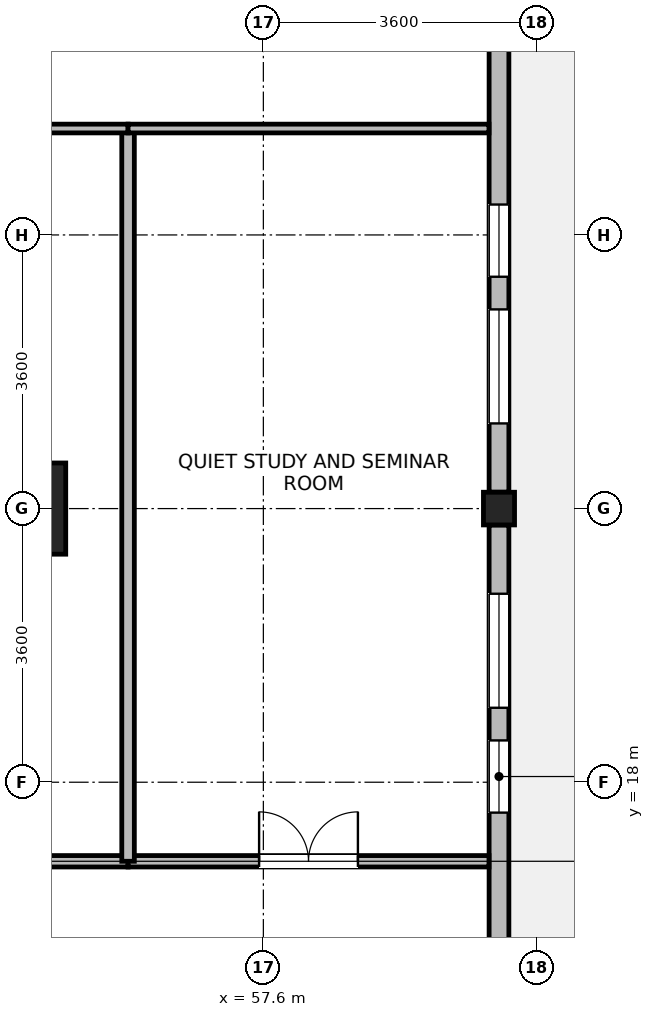
"""IFC4 building model, lengths in metres.
Left out: names, types, materials, properties, quantities, classifications, styles, units other than length and angle.
Written with IfcOpenShell. Run it as: python <this file> out.ifc"""

import sys

from ifc_helpers import new_model, si_unit, direction, frame, frame_2d, origin, origin_2d, place, context, subcontext, project, spatial, rectangle, i_section, extrude, source, transform, mapped, element, fill, save


model = new_model("IFC4")
c1 = context("Model", 3, precision=1e-05, world=origin(), true_north=direction((0.0, 1.0)))
c2 = subcontext(c1, "Body", "Model", "MODEL_VIEW")
j1 = project(units=[si_unit("LENGTHUNIT", "METRE"), si_unit("PLANEANGLEUNIT", "RADIAN")], contexts=[c1])
p1 = place(None, origin())
s1 = spatial("IfcSite", under=j1, at=p1, CompositionType="ELEMENT")
p2 = place(p1, origin())
s2 = spatial("IfcBuilding", under=s1, at=p2, CompositionType="ELEMENT")
p3 = place(p2, frame((0.0, 0.0, 123.0)))
s3 = spatial("IfcBuildingStorey", under=s2, at=p3, CompositionType="ELEMENT", Elevation=123.0)
m1 = source(origin(), c2, "Body", "SweptSolid", [
    extrude(rectangle(XDim=1.2, YDim=1.2, at=origin_2d()), origin(), (0.0, 0.0, 1.0), 3.7),
])
p4 = place(p3, frame((54.4, 21.6, 0.0), z_axis=(0.0, 0.0, 1.0), x_axis=(1.0, 0.0, 0.0)))
e1 = element("IfcColumn", 1, at=p4, inside=s3, PredefinedType="COLUMN", context=c2, shape_type="MappedRepresentation", body=[
    mapped(m1, transform((0.0, 0.0, 0.0), x_axis=(1.0, 0.0, 0.0), y_axis=(0.0, 1.0, 0.0), z_axis=(0.0, 0.0, 1.0), scale=1.0)),
])
m2 = source(origin(), c2, "Body", "SweptSolid", [
    extrude(i_section(OverallWidth=0.409, OverallDepth=0.43, WebThickness=0.024, FlangeThickness=0.033, FilletRadius=0.015, at=origin_2d()), origin(), (0.0, 0.0, 1.0), 3.7),
])
p5 = place(p3, frame((60.7, 21.6, 0.0), z_axis=(0.0, 0.0, 1.0), x_axis=(1.0, 0.0, 0.0)))
e2 = element("IfcColumn", 2, at=p5, inside=s3, PredefinedType="COLUMN", context=c2, shape_type="MappedRepresentation", body=[
    mapped(m2, transform((0.0, 0.0, 0.0), x_axis=(1.0, 0.0, 0.0), y_axis=(0.0, 1.0, 0.0), z_axis=(0.0, 0.0, 1.0), scale=1.0)),
])
p6 = place(p3, frame((60.7, 21.384, 0.0), z_axis=(0.0, 0.0, 1.0), x_axis=(0.0, -1.0, 0.0)))
e3 = element("IfcWall", 3, at=p6, inside=s3, PredefinedType="STANDARD", context=c2, shape_type="SweptSolid", body=[
    extrude(rectangle(XDim=6.618, YDim=0.26, at=frame_2d((3.309, 0.0))), origin(), (0.0, 0.0, 1.0), 2.98),
])
p7 = place(p6, frame((0.905, 0.0, 0.85)))
e4 = element("IfcOpeningElement", 4, at=p7, cuts=e3, PredefinedType="OPENING", context=c2, shape_type="SweptSolid", body=[
    extrude(rectangle(XDim=1.5, YDim=1.85, at=frame_2d((0.75, 0.925))), frame((0.0, 0.14, 0.0), z_axis=(0.0, -1.0, 0.0), x_axis=(1.0, 0.0, 0.0)), (0.0, 0.0, 1.0), 0.28),
])
p8 = place(p6, frame((2.834, 0.0, 0.85)))
e5 = element("IfcOpeningElement", 5, at=p8, cuts=e3, PredefinedType="OPENING", context=c2, shape_type="SweptSolid", body=[
    extrude(rectangle(XDim=0.95, YDim=1.75, at=frame_2d((0.475, 0.875))), frame((0.0, 0.14, 0.0), z_axis=(0.0, -1.0, 0.0), x_axis=(1.0, 0.0, 0.0)), (0.0, 0.0, 1.0), 0.28),
])
p9 = place(p3, frame((60.7, 28.434, 0.0), z_axis=(0.0, 0.0, 1.0), x_axis=(0.0, -1.0, 0.0)))
e6 = element("IfcWall", 6, at=p9, inside=s3, PredefinedType="STANDARD", context=c2, shape_type="SweptSolid", body=[
    extrude(rectangle(XDim=6.618, YDim=0.26, at=frame_2d((3.309, 0.0))), origin(), (0.0, 0.0, 1.0), 2.98),
])
p10 = place(p9, frame((4.213, 0.0, 0.85)))
e7 = element("IfcOpeningElement", 7, at=p10, cuts=e6, PredefinedType="OPENING", context=c2, shape_type="SweptSolid", body=[
    extrude(rectangle(XDim=1.5, YDim=1.85, at=frame_2d((0.75, 0.925))), frame((0.0, 0.14, 0.0), z_axis=(0.0, -1.0, 0.0), x_axis=(1.0, 0.0, 0.0)), (0.0, 0.0, 1.0), 0.28),
])
p11 = place(p9, frame((2.834, 0.0, 0.85)))
e8 = element("IfcOpeningElement", 8, at=p11, cuts=e6, PredefinedType="OPENING", context=c2, shape_type="SweptSolid", body=[
    extrude(rectangle(XDim=0.95, YDim=1.75, at=frame_2d((0.475, 0.875))), frame((0.0, 0.14, 0.0), z_axis=(0.0, -1.0, 0.0), x_axis=(1.0, 0.0, 0.0)), (0.0, 0.0, 1.0), 0.28),
])
p12 = place(p3, frame((48.44, 16.96, 0.0), z_axis=(0.0, 0.0, 1.0), x_axis=(1.0, 0.0, 0.0)))
e9 = element("IfcWall", 9, at=p12, inside=s3, PredefinedType="PARTITIONING", context=c2, shape_type="SweptSolid", body=[
    extrude(rectangle(XDim=7.38, YDim=0.15, at=frame_2d((3.69, 0.0))), origin(), (0.0, 0.0, 1.0), 3.43),
])
p13 = place(p12, frame((3.24, 0.0, 0.0)))
e10 = element("IfcOpeningElement", 10, at=p13, cuts=e9, PredefinedType="OPENING", context=c2, shape_type="SweptSolid", body=[
    extrude(rectangle(XDim=0.9, YDim=2.08, at=frame_2d((0.45, 1.04))), frame((0.0, 0.085, 0.0), z_axis=(0.0, -1.0, 0.0), x_axis=(1.0, 0.0, 0.0)), (0.0, 0.0, 1.0), 0.17),
])
p14 = place(p3, frame((55.82, 16.96, 0.0), z_axis=(0.0, 0.0, 1.0), x_axis=(1.0, 0.0, 0.0)))
e11 = element("IfcWall", 11, at=p14, inside=s3, PredefinedType="PARTITIONING", context=c2, shape_type="SweptSolid", body=[
    extrude(rectangle(XDim=4.748, YDim=0.15, at=frame_2d((2.374, 0.0))), origin(), (0.0, 0.0, 1.0), 3.43),
])
p15 = place(p14, frame((1.724, 0.0, 0.0)))
e12 = element("IfcOpeningElement", 12, at=p15, cuts=e11, PredefinedType="OPENING", context=c2, shape_type="SweptSolid", body=[
    extrude(rectangle(XDim=1.3, YDim=2.12, at=frame_2d((0.65, 1.06))), frame((0.0, 0.085, 0.0), z_axis=(0.0, -1.0, 0.0), x_axis=(1.0, 0.0, 0.0)), (0.0, 0.0, 1.0), 0.17),
])
p16 = place(p3, frame((55.82, 16.96, 0.0), z_axis=(0.0, 0.0, 1.0), x_axis=(0.0, 1.0, 0.0)))
e13 = element("IfcWall", 13, at=p16, inside=s3, PredefinedType="PARTITIONING", context=c2, shape_type="SweptSolid", body=[
    extrude(rectangle(XDim=9.64, YDim=0.165, at=frame_2d((4.82, 0.0))), origin(), (0.0, 0.0, 1.0), 3.43),
])
p17 = place(p3, frame((48.44, 26.6, 0.0), z_axis=(0.0, 0.0, 1.0), x_axis=(1.0, 0.0, 0.0)))
e14 = element("IfcWall", 14, at=p17, inside=s3, PredefinedType="PARTITIONING", context=c2, shape_type="SweptSolid", body=[
    extrude(rectangle(XDim=7.38, YDim=0.115, at=frame_2d((3.69, 0.0))), origin(), (0.0, 0.0, 1.0), 3.43),
])
p18 = place(p3, frame((55.82, 26.6, 0.0), z_axis=(0.0, 0.0, 1.0), x_axis=(1.0, 0.0, 0.0)))
e15 = element("IfcWall", 15, at=p18, inside=s3, PredefinedType="PARTITIONING", context=c2, shape_type="SweptSolid", body=[
    extrude(rectangle(XDim=4.748, YDim=0.115, at=frame_2d((2.374, 0.0))), origin(), (0.0, 0.0, 1.0), 3.43),
])
p19 = place(p7, origin())
e16 = element("IfcWindow", 16, at=p19, inside=s3, PartitioningType="SINGLE_PANEL", PredefinedType="WINDOW", context=c2, shape_type="SweptSolid", body=[
    extrude(rectangle(XDim=1.5, YDim=1.85, at=frame_2d((0.75, 0.925))), frame((0.0, 0.03, 0.0), z_axis=(0.0, -1.0, 0.0), x_axis=(1.0, 0.0, 0.0)), (0.0, 0.0, 1.0), 0.06),
])
fill(e4, e16)
p20 = place(p8, origin())
e17 = element("IfcWindow", 17, at=p20, inside=s3, PartitioningType="SINGLE_PANEL", PredefinedType="WINDOW", context=c2, shape_type="SweptSolid", body=[
    extrude(rectangle(XDim=0.95, YDim=1.75, at=frame_2d((0.475, 0.875))), frame((0.0, 0.03, 0.0), z_axis=(0.0, -1.0, 0.0), x_axis=(1.0, 0.0, 0.0)), (0.0, 0.0, 1.0), 0.06),
])
fill(e5, e17)
p21 = place(p10, origin())
e18 = element("IfcWindow", 18, at=p21, inside=s3, PartitioningType="SINGLE_PANEL", PredefinedType="WINDOW", context=c2, shape_type="SweptSolid", body=[
    extrude(rectangle(XDim=1.5, YDim=1.85, at=frame_2d((0.75, 0.925))), frame((0.0, 0.03, 0.0), z_axis=(0.0, -1.0, 0.0), x_axis=(1.0, 0.0, 0.0)), (0.0, 0.0, 1.0), 0.06),
])
fill(e7, e18)
p22 = place(p11, origin())
e19 = element("IfcWindow", 19, at=p22, inside=s3, PartitioningType="SINGLE_PANEL", PredefinedType="WINDOW", context=c2, shape_type="SweptSolid", body=[
    extrude(rectangle(XDim=0.95, YDim=1.75, at=frame_2d((0.475, 0.875))), frame((0.0, 0.03, 0.0), z_axis=(0.0, -1.0, 0.0), x_axis=(1.0, 0.0, 0.0)), (0.0, 0.0, 1.0), 0.06),
])
fill(e8, e19)
p23 = place(p15, origin())
e20 = element("IfcDoor", 20, at=p23, inside=s3, OperationType="DOUBLE_DOOR_SINGLE_SWING", PredefinedType="DOOR", context=c2, shape_type="SweptSolid", body=[
    extrude(rectangle(XDim=1.3, YDim=2.12, at=frame_2d((0.65, 1.06))), frame((0.0, 0.025, 0.0), z_axis=(0.0, -1.0, 0.0), x_axis=(1.0, 0.0, 0.0)), (0.0, 0.0, 1.0), 0.05),
])
fill(e12, e20)
save(model, sys.argv[1])
